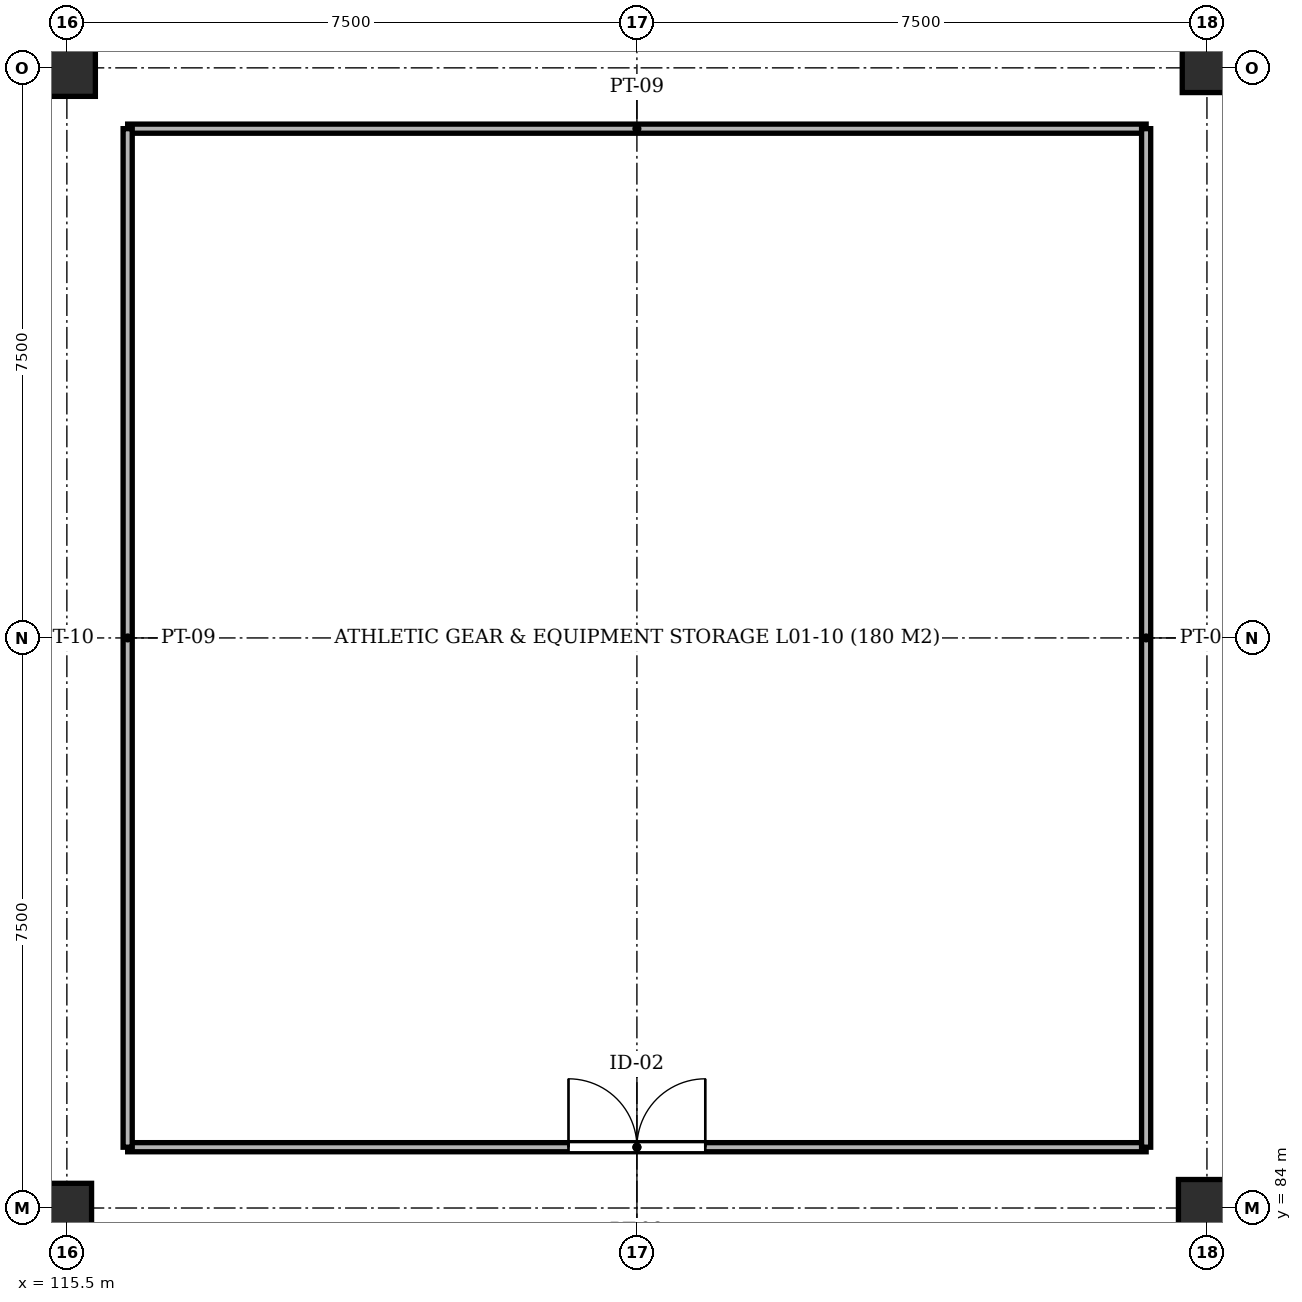
"""IFC4 building model, lengths in metres.
Left out: names, types, materials, properties, quantities, classifications, styles, units other than length and angle.
Written with IfcOpenShell. Run it as: python <this file> out.ifc"""

import sys

from ifc_helpers import new_model, si_unit, direction, frame, frame_2d, origin, origin_2d, place, context, subcontext, project, spatial, rectangle, extrude, element, fill, save


model = new_model("IFC4")
c1 = context("Model", 3, precision=1e-05, world=origin(), true_north=direction((0.0, 1.0)))
c2 = subcontext(c1, "Body", "Model", "MODEL_VIEW")
j1 = project(units=[si_unit("LENGTHUNIT", "METRE"), si_unit("PLANEANGLEUNIT", "RADIAN")], contexts=[c1])
p1 = place(None, origin())
s1 = spatial("IfcSite", under=j1, at=p1, CompositionType="ELEMENT")
p2 = place(p1, origin())
s2 = spatial("IfcBuilding", under=s1, at=p2, CompositionType="ELEMENT")
p3 = place(p2, frame((0.0, 0.0, 4.6)))
s3 = spatial("IfcBuildingStorey", under=s2, at=p3, CompositionType="ELEMENT", Elevation=4.6)
p4 = place(p3, frame((115.5, 84.0, -0.3), z_axis=(0.0, 0.0, 1.0), x_axis=(1.0, 0.0, 0.0)))
e1 = element("IfcColumn", 1, at=p4, inside=s3, PredefinedType="COLUMN", context=c2, shape_type="SweptSolid", body=[
    extrude(rectangle(XDim=0.65, YDim=0.65, at=origin_2d()), origin(), (0.0, 0.0, 1.0), 4.65),
])
for number, where, z_axis, x_axis in (
    (2, (115.5, 99.0, -0.3), (0.0, 0.0, 1.0), (1.0, 0.0, 0.0)),
    (3, (130.5, 84.0, -0.3), (0.0, 0.0, 1.0), (1.0, 0.0, 0.0)),
):
    element("IfcColumn", number, at=place(p3, frame(where, z_axis=z_axis, x_axis=x_axis)), inside=s3, PredefinedType="COLUMN", context=c2, shape_type="SweptSolid", body=[
        extrude(rectangle(XDim=0.75, YDim=0.75, at=origin_2d()), origin(), (0.0, 0.0, 1.0), 4.65),
    ])
p5 = place(p3, frame((130.5, 99.0, -0.3), z_axis=(0.0, 0.0, 1.0), x_axis=(1.0, 0.0, 0.0)))
e4 = element("IfcColumn", 4, at=p5, inside=s3, PredefinedType="COLUMN", context=c2, shape_type="SweptSolid", body=[
    extrude(rectangle(XDim=0.65, YDim=0.65, at=origin_2d()), origin(), (0.0, 0.0, 1.0), 4.65),
])
p6 = place(p3, frame((116.3, 84.8, 0.0), z_axis=(0.0, 0.0, 1.0), x_axis=(1.0, 0.0, 0.0)))
e5 = element("IfcWall", 5, at=p6, inside=s3, PredefinedType="PARTITIONING", context=c2, shape_type="SweptSolid", body=[
    extrude(rectangle(XDim=13.4, YDim=0.12, at=frame_2d((6.7, 0.0))), origin(), (0.0, 0.0, 1.0), 4.08),
])
p7 = place(p6, frame((5.8, 0.0, 0.0)))
e6 = element("IfcOpeningElement", 6, at=p7, cuts=e5, PredefinedType="OPENING", context=c2, shape_type="SweptSolid", body=[
    extrude(rectangle(XDim=1.8, YDim=2.25, at=frame_2d((0.9, 1.125))), frame((0.0, 0.072, 0.0), z_axis=(0.0, -1.0, 0.0), x_axis=(1.0, 0.0, 0.0)), (0.0, 0.0, 1.0), 0.144),
])
for number, where, z_axis, x_axis in (
    (7, (116.3, 98.2, 0.0), (0.0, 0.0, 1.0), (1.0, 0.0, 0.0)),
    (8, (116.3, 84.8, 0.0), (0.0, 0.0, 1.0), (0.0, 1.0, 0.0)),
    (9, (129.7, 84.8, 0.0), (0.0, 0.0, 1.0), (0.0, 1.0, 0.0)),
):
    element("IfcWall", number, at=place(p3, frame(where, z_axis=z_axis, x_axis=x_axis)), inside=s3, PredefinedType="PARTITIONING", context=c2, shape_type="SweptSolid", body=[
        extrude(rectangle(XDim=13.4, YDim=0.12, at=frame_2d((6.7, 0.0))), origin(), (0.0, 0.0, 1.0), 4.08),
    ])
p8 = place(p7, origin())
e10 = element("IfcDoor", 10, at=p8, inside=s3, OperationType="DOUBLE_DOOR_SINGLE_SWING", PredefinedType="DOOR", context=c2, shape_type="SweptSolid", body=[
    extrude(rectangle(XDim=1.8, YDim=2.25, at=frame_2d((0.9, 1.125))), frame((0.0, 0.025, 0.0), z_axis=(0.0, -1.0, 0.0), x_axis=(1.0, 0.0, 0.0)), (0.0, 0.0, 1.0), 0.05),
])
fill(e6, e10)
save(model, sys.argv[1])
